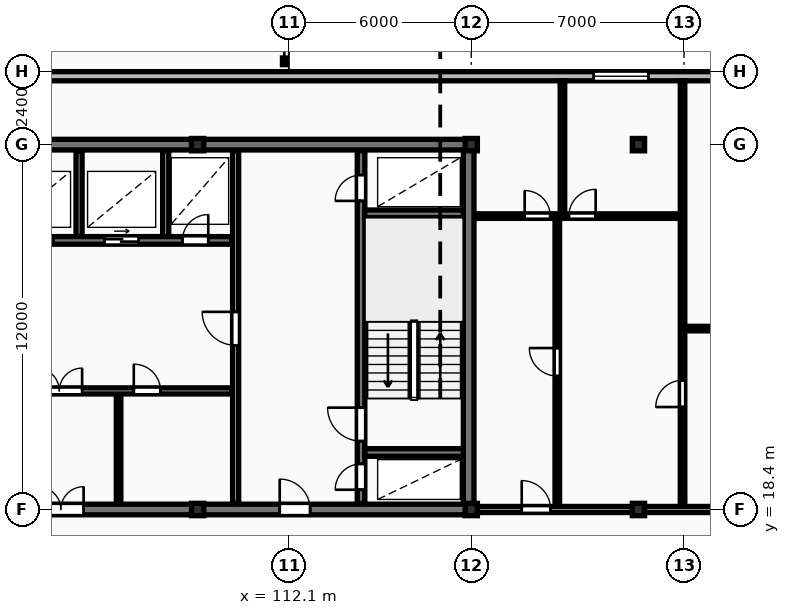
"""IFC4 building model, lengths in metres.
Left out: names, types, materials, properties, quantities, classifications, styles, units other than length and angle.
Written with IfcOpenShell. Run it as: python <this file> out.ifc"""

import sys

from ifc_helpers import new_model, si_unit, direction, frame, frame_2d, origin, origin_2d, place, context, subcontext, project, spatial, rectangle, i_section, extrude, element, fill, save


model = new_model("IFC4")
c1 = context("Model", 3, precision=1e-05, world=origin(), true_north=direction((0.0, 1.0)))
c2 = subcontext(c1, "Body", "Model", "MODEL_VIEW")
j1 = project(units=[si_unit("LENGTHUNIT", "METRE"), si_unit("PLANEANGLEUNIT", "RADIAN")], contexts=[c1])
p1 = place(None, origin())
s1 = spatial("IfcSite", under=j1, at=p1, CompositionType="ELEMENT")
p2 = place(p1, origin())
s2 = spatial("IfcBuilding", under=s1, at=p2, CompositionType="ELEMENT")
p3 = place(p2, frame((0.0, 0.0, 150.1)))
s3 = spatial("IfcBuildingStorey", under=s2, at=p3, CompositionType="ELEMENT", Elevation=150.1)
for number, where, z_axis, x_axis in (
    (1, (109.1, 18.4, 0.0), (0.0, 0.0, 1.0), (1.0, 0.0, 0.0)),
    (2, (109.1, 30.4, 0.0), (0.0, 0.0, 1.0), (1.0, 0.0, 0.0)),
    (3, (118.1, 18.4, 0.0), (0.0, 0.0, 1.0), (1.0, 0.0, 0.0)),
    (4, (118.1, 30.4, 0.0), (0.0, 0.0, 1.0), (1.0, 0.0, 0.0)),
    (5, (123.6, 18.4, 0.0), (0.0, 0.0, 1.0), (1.0, 0.0, 0.0)),
    (6, (123.6, 30.4, 0.0), (0.0, 0.0, 1.0), (1.0, 0.0, 0.0)),
):
    element("IfcColumn", number, at=place(p3, frame(where, z_axis=z_axis, x_axis=x_axis)), inside=s3, PredefinedType="COLUMN", context=c2, shape_type="SweptSolid", body=[
        extrude(i_section(OverallWidth=0.403, OverallDepth=0.406, WebThickness=0.027, FlangeThickness=0.043, FilletRadius=0.015, at=origin_2d()), origin(), (0.0, 0.0, 1.0), 3.6),
    ])
p4 = place(p3, frame((130.7, 32.65, 0.0), z_axis=(0.0, 0.0, 1.0), x_axis=(-1.0, 0.0, 0.0)))
e7 = element("IfcWall", 7, at=p4, inside=s3, PredefinedType="STANDARD", context=c2, shape_type="SweptSolid", body=[
    extrude(rectangle(XDim=58.0, YDim=0.3, at=frame_2d((29.0, 0.0))), origin(), (0.0, 0.0, 1.0), 3.31),
])
p5 = place(p4, frame((50.125, 0.0, 0.85)))
e8 = element("IfcOpeningElement", 8, at=p5, cuts=e7, PredefinedType="OPENING", context=c2, shape_type="SweptSolid", body=[
    extrude(rectangle(XDim=1.8, YDim=1.8, at=frame_2d((0.9, 0.9))), frame((0.0, 0.16, 0.0), z_axis=(0.0, -1.0, 0.0), x_axis=(1.0, 0.0, 0.0)), (0.0, 0.0, 1.0), 0.32),
])
p6 = place(p4, frame((6.775, 0.0, 0.85)))
e9 = element("IfcOpeningElement", 9, at=p6, cuts=e7, PredefinedType="OPENING", context=c2, shape_type="SweptSolid", body=[
    extrude(rectangle(XDim=1.8, YDim=1.8, at=frame_2d((0.9, 0.9))), frame((0.0, 0.16, 0.0), z_axis=(0.0, -1.0, 0.0), x_axis=(1.0, 0.0, 0.0)), (0.0, 0.0, 1.0), 0.32),
])
p7 = place(p4, frame((38.0, 0.0, 0.0)))
e10 = element("IfcOpeningElement", 10, at=p7, cuts=e7, PredefinedType="OPENING", context=c2, shape_type="SweptSolid", body=[
    extrude(rectangle(XDim=1.1, YDim=2.1, at=frame_2d((0.55, 1.05))), frame((0.0, 0.16, 0.0), z_axis=(0.0, -1.0, 0.0), x_axis=(1.0, 0.0, 0.0)), (0.0, 0.0, 1.0), 0.32),
])
p8 = place(p3, frame((81.925, 30.4, 0.0), z_axis=(0.0, 0.0, 1.0), x_axis=(1.0, 0.0, 0.0)))
e11 = element("IfcWall", 11, at=p8, inside=s3, PredefinedType="SHEAR", context=c2, shape_type="SweptSolid", body=[
    extrude(rectangle(XDim=36.265, YDim=0.35, at=frame_2d((18.132, 0.0))), origin(), (0.0, 0.0, 1.0), 3.6),
])
p9 = place(p8, frame((9.675, 0.0, 0.0)))
e12 = element("IfcOpeningElement", 12, at=p9, cuts=e11, PredefinedType="OPENING", context=c2, shape_type="SweptSolid", body=[
    extrude(rectangle(XDim=1.1, YDim=2.1, at=frame_2d((0.55, 1.05))), frame((0.0, 0.185, 0.0), z_axis=(0.0, -1.0, 0.0), x_axis=(1.0, 0.0, 0.0)), (0.0, 0.0, 1.0), 0.37),
])
p10 = place(p3, frame((118.015, 18.575, 0.0), z_axis=(0.0, 0.0, 1.0), x_axis=(0.0, 1.0, 0.0)))
e13 = element("IfcWall", 13, at=p10, inside=s3, PredefinedType="SHEAR", context=c2, shape_type="SweptSolid", body=[
    extrude(rectangle(XDim=11.65, YDim=0.35, at=frame_2d((5.825, 0.0))), origin(), (0.0, 0.0, 1.0), 3.6),
])
p11 = place(p3, frame((81.925, 18.4, 0.0), z_axis=(0.0, 0.0, 1.0), x_axis=(1.0, 0.0, 0.0)))
e14 = element("IfcWall", 14, at=p11, inside=s3, PredefinedType="SHEAR", context=c2, shape_type="SweptSolid", body=[
    extrude(rectangle(XDim=36.265, YDim=0.35, at=frame_2d((18.132, 0.0))), origin(), (0.0, 0.0, 1.0), 3.6),
])
p12 = place(p11, frame((5.675, 0.0, 0.0)))
e15 = element("IfcOpeningElement", 15, at=p12, cuts=e14, PredefinedType="OPENING", context=c2, shape_type="SweptSolid", body=[
    extrude(rectangle(XDim=1.0, YDim=2.15, at=frame_2d((0.5, 1.075))), frame((0.0, 0.185, 0.0), z_axis=(0.0, -1.0, 0.0), x_axis=(1.0, 0.0, 0.0)), (0.0, 0.0, 1.0), 0.37),
])
p13 = place(p11, frame((21.925, 0.0, 0.0)))
e16 = element("IfcOpeningElement", 16, at=p13, cuts=e14, PredefinedType="OPENING", context=c2, shape_type="SweptSolid", body=[
    extrude(rectangle(XDim=1.5, YDim=2.2, at=frame_2d((0.75, 1.1))), frame((0.0, 0.185, 0.0), z_axis=(0.0, -1.0, 0.0), x_axis=(1.0, 0.0, 0.0)), (0.0, 0.0, 1.0), 0.37),
])
p14 = place(p11, frame((29.875, 0.0, 0.0)))
e17 = element("IfcOpeningElement", 17, at=p14, cuts=e14, PredefinedType="OPENING", context=c2, shape_type="SweptSolid", body=[
    extrude(rectangle(XDim=1.0, YDim=2.15, at=frame_2d((0.5, 1.075))), frame((0.0, 0.185, 0.0), z_axis=(0.0, -1.0, 0.0), x_axis=(1.0, 0.0, 0.0)), (0.0, 0.0, 1.0), 0.37),
])
for number, where, z_axis, x_axis in (
    (18, (105.2, 27.38, 0.0), (0.0, 0.0, 1.0), (0.0, 1.0, 0.0)),
    (19, (108.05, 27.38, 0.0), (0.0, 0.0, 1.0), (0.0, 1.0, 0.0)),
):
    element("IfcWall", number, at=place(p3, frame(where, z_axis=z_axis, x_axis=x_axis)), inside=s3, PredefinedType="PARTITIONING", context=c2, shape_type="SweptSolid", body=[
        extrude(rectangle(XDim=2.82, YDim=0.2, at=frame_2d((1.41, 0.0))), origin(), (0.0, 0.0, 1.0), 3.31),
    ])
p15 = place(p3, frame((99.68, 27.25, 0.0), z_axis=(0.0, 0.0, 1.0), x_axis=(1.0, 0.0, 0.0)))
e20 = element("IfcWall", 20, at=p15, inside=s3, PredefinedType="SHEAR", context=c2, shape_type="SweptSolid", body=[
    extrude(rectangle(XDim=10.54, YDim=0.25, at=frame_2d((5.27, 0.0))), origin(), (0.0, 0.0, 1.0), 3.6),
])
p16 = place(p15, frame((0.76, 0.0, 0.0)))
e21 = element("IfcOpeningElement", 21, at=p16, cuts=e20, PredefinedType="OPENING", context=c2, shape_type="SweptSolid", body=[
    extrude(rectangle(XDim=1.12, YDim=2.12, at=frame_2d((0.56, 1.06))), frame((0.0, 0.135, 0.0), z_axis=(0.0, -1.0, 0.0), x_axis=(1.0, 0.0, 0.0)), (0.0, 0.0, 1.0), 0.27),
])
p17 = place(p15, frame((3.56, 0.0, 0.0)))
e22 = element("IfcOpeningElement", 22, at=p17, cuts=e20, PredefinedType="OPENING", context=c2, shape_type="SweptSolid", body=[
    extrude(rectangle(XDim=1.12, YDim=2.12, at=frame_2d((0.56, 1.06))), frame((0.0, 0.135, 0.0), z_axis=(0.0, -1.0, 0.0), x_axis=(1.0, 0.0, 0.0)), (0.0, 0.0, 1.0), 0.27),
])
p18 = place(p15, frame((6.36, 0.0, 0.0)))
e23 = element("IfcOpeningElement", 23, at=p18, cuts=e20, PredefinedType="OPENING", context=c2, shape_type="SweptSolid", body=[
    extrude(rectangle(XDim=1.12, YDim=2.12, at=frame_2d((0.56, 1.06))), frame((0.0, 0.135, 0.0), z_axis=(0.0, -1.0, 0.0), x_axis=(1.0, 0.0, 0.0)), (0.0, 0.0, 1.0), 0.27),
])
p19 = place(p15, frame((8.92, 0.0, 0.0)))
e24 = element("IfcOpeningElement", 24, at=p19, cuts=e20, PredefinedType="OPENING", context=c2, shape_type="SweptSolid", body=[
    extrude(rectangle(XDim=0.85, YDim=2.05, at=frame_2d((0.425, 1.025))), frame((0.0, 0.135, 0.0), z_axis=(0.0, -1.0, 0.0), x_axis=(1.0, 0.0, 0.0)), (0.0, 0.0, 1.0), 0.27),
])
p20 = place(p3, frame((106.5, 18.6, 0.0), z_axis=(0.0, 0.0, 1.0), x_axis=(0.0, 1.0, 0.0)))
e25 = element("IfcWall", 25, at=p20, inside=s3, PredefinedType="PARTITIONING", context=c2, shape_type="SweptSolid", body=[
    extrude(rectangle(XDim=3.6, YDim=0.15, at=frame_2d((1.8, 0.0))), origin(), (0.0, 0.0, 1.0), 3.31),
])
p21 = place(p3, frame((91.08, 22.3, 0.0), z_axis=(0.0, 0.0, 1.0), x_axis=(1.0, 0.0, 0.0)))
e26 = element("IfcWall", 26, at=p21, inside=s3, PredefinedType="PARTITIONING", context=c2, shape_type="SweptSolid", body=[
    extrude(rectangle(XDim=19.14, YDim=0.2, at=frame_2d((9.57, 0.0))), origin(), (0.0, 0.0, 1.0), 3.31),
])
p22 = place(p21, frame((1.15, 0.0, 0.0)))
e27 = element("IfcOpeningElement", 27, at=p22, cuts=e26, PredefinedType="OPENING", context=c2, shape_type="SweptSolid", body=[
    extrude(rectangle(XDim=0.85, YDim=2.05, at=frame_2d((0.425, 1.025))), frame((0.0, 0.11, 0.0), z_axis=(0.0, -1.0, 0.0), x_axis=(1.0, 0.0, 0.0)), (0.0, 0.0, 1.0), 0.22),
])
p23 = place(p21, frame((3.2, 0.0, 0.0)))
e28 = element("IfcOpeningElement", 28, at=p23, cuts=e26, PredefinedType="OPENING", context=c2, shape_type="SweptSolid", body=[
    extrude(rectangle(XDim=0.85, YDim=2.05, at=frame_2d((0.425, 1.025))), frame((0.0, 0.11, 0.0), z_axis=(0.0, -1.0, 0.0), x_axis=(1.0, 0.0, 0.0)), (0.0, 0.0, 1.0), 0.22),
])
p24 = place(p21, frame((12.72, 0.0, 0.0)))
e29 = element("IfcOpeningElement", 29, at=p24, cuts=e26, PredefinedType="OPENING", context=c2, shape_type="SweptSolid", body=[
    extrude(rectangle(XDim=1.5, YDim=2.2, at=frame_2d((0.75, 1.1))), frame((0.0, 0.11, 0.0), z_axis=(0.0, -1.0, 0.0), x_axis=(1.0, 0.0, 0.0)), (0.0, 0.0, 1.0), 0.22),
])
p25 = place(p21, frame((6.42, 0.0, 0.0)))
e30 = element("IfcOpeningElement", 30, at=p25, cuts=e26, PredefinedType="OPENING", context=c2, shape_type="SweptSolid", body=[
    extrude(rectangle(XDim=0.92, YDim=2.08, at=frame_2d((0.46, 1.04))), frame((0.0, 0.11, 0.0), z_axis=(0.0, -1.0, 0.0), x_axis=(1.0, 0.0, 0.0)), (0.0, 0.0, 1.0), 0.22),
])
p26 = place(p21, frame((15.92, 0.0, 0.0)))
e31 = element("IfcOpeningElement", 31, at=p26, cuts=e26, PredefinedType="OPENING", context=c2, shape_type="SweptSolid", body=[
    extrude(rectangle(XDim=0.88, YDim=2.06, at=frame_2d((0.44, 1.03))), frame((0.0, 0.11, 0.0), z_axis=(0.0, -1.0, 0.0), x_axis=(1.0, 0.0, 0.0)), (0.0, 0.0, 1.0), 0.22),
])
p27 = place(p3, frame((110.35, 18.6, 0.0), z_axis=(0.0, 0.0, 1.0), x_axis=(0.0, 1.0, 0.0)))
e32 = element("IfcWall", 32, at=p27, inside=s3, PredefinedType="PARTITIONING", context=c2, shape_type="SweptSolid", body=[
    extrude(rectangle(XDim=11.6, YDim=0.2, at=frame_2d((5.8, 0.0))), origin(), (0.0, 0.0, 1.0), 3.31),
])
p28 = place(p27, frame((5.2, 0.0, 0.0)))
e33 = element("IfcOpeningElement", 33, at=p28, cuts=e32, PredefinedType="OPENING", context=c2, shape_type="SweptSolid", body=[
    extrude(rectangle(XDim=1.1, YDim=2.15, at=frame_2d((0.55, 1.075))), frame((0.0, 0.11, 0.0), z_axis=(0.0, -1.0, 0.0), x_axis=(1.0, 0.0, 0.0)), (0.0, 0.0, 1.0), 0.22),
])
p29 = place(p3, frame((114.475, 18.6, 0.0), z_axis=(0.0, 0.0, 1.0), x_axis=(0.0, 1.0, 0.0)))
e34 = element("IfcWall", 34, at=p29, inside=s3, PredefinedType="SHEAR", context=c2, shape_type="SweptSolid", body=[
    extrude(rectangle(XDim=11.6, YDim=0.25, at=frame_2d((5.8, 0.0))), origin(), (0.0, 0.0, 1.0), 3.6),
])
p30 = place(p29, frame((0.45, 0.0, 0.0)))
e35 = element("IfcOpeningElement", 35, at=p30, cuts=e34, PredefinedType="OPENING", context=c2, shape_type="SweptSolid", body=[
    extrude(rectangle(XDim=0.85, YDim=2.05, at=frame_2d((0.425, 1.025))), frame((0.0, 0.135, 0.0), z_axis=(0.0, -1.0, 0.0), x_axis=(1.0, 0.0, 0.0)), (0.0, 0.0, 1.0), 0.27),
])
p31 = place(p29, frame((2.05, 0.0, 0.0)))
e36 = element("IfcOpeningElement", 36, at=p31, cuts=e34, PredefinedType="OPENING", context=c2, shape_type="SweptSolid", body=[
    extrude(rectangle(XDim=1.1, YDim=2.1, at=frame_2d((0.55, 1.05))), frame((0.0, 0.135, 0.0), z_axis=(0.0, -1.0, 0.0), x_axis=(1.0, 0.0, 0.0)), (0.0, 0.0, 1.0), 0.27),
])
p32 = place(p29, frame((9.95, 0.0, 0.0)))
e37 = element("IfcOpeningElement", 37, at=p32, cuts=e34, PredefinedType="OPENING", context=c2, shape_type="SweptSolid", body=[
    extrude(rectangle(XDim=0.85, YDim=2.05, at=frame_2d((0.425, 1.025))), frame((0.0, 0.135, 0.0), z_axis=(0.0, -1.0, 0.0), x_axis=(1.0, 0.0, 0.0)), (0.0, 0.0, 1.0), 0.27),
])
for number, where, z_axis, x_axis in (
    (38, (114.6, 20.275, 0.0), (0.0, 0.0, 1.0), (1.0, 0.0, 0.0)),
    (39, (114.6, 28.125, 0.0), (0.0, 0.0, 1.0), (1.0, 0.0, 0.0)),
):
    element("IfcWall", number, at=place(p3, frame(where, z_axis=z_axis, x_axis=x_axis)), inside=s3, PredefinedType="SHEAR", context=c2, shape_type="SweptSolid", body=[
        extrude(rectangle(XDim=3.24, YDim=0.25, at=frame_2d((1.62, 0.0))), origin(), (0.0, 0.0, 1.0), 3.6),
    ])
p33 = place(p3, frame((125.05, 24.35, 0.0), z_axis=(0.0, 0.0, 1.0), x_axis=(1.0, 0.0, 0.0)))
e40 = element("IfcWall", 40, at=p33, inside=s3, PredefinedType="PARTITIONING", context=c2, shape_type="SweptSolid", body=[
    extrude(rectangle(XDim=5.65, YDim=0.15, at=frame_2d((2.825, 0.0))), origin(), (0.0, 0.0, 1.0), 3.31),
])
p34 = place(p33, frame((2.405, 0.0, 0.0)))
e41 = element("IfcOpeningElement", 41, at=p34, cuts=e40, PredefinedType="OPENING", context=c2, shape_type="SweptSolid", body=[
    extrude(rectangle(XDim=0.84, YDim=2.04, at=frame_2d((0.42, 1.02))), frame((0.0, 0.085, 0.0), z_axis=(0.0, -1.0, 0.0), x_axis=(1.0, 0.0, 0.0)), (0.0, 0.0, 1.0), 0.17),
])
p35 = place(p3, frame((125.05, 18.45, 0.0), z_axis=(0.0, 0.0, 1.0), x_axis=(0.0, 1.0, 0.0)))
e42 = element("IfcWall", 42, at=p35, inside=s3, PredefinedType="PARTITIONING", context=c2, shape_type="SweptSolid", body=[
    extrude(rectangle(XDim=14.05, YDim=0.15, at=frame_2d((7.025, 0.0))), origin(), (0.0, 0.0, 1.0), 3.31),
])
p36 = place(p35, frame((3.32, 0.0, 0.0)))
e43 = element("IfcOpeningElement", 43, at=p36, cuts=e42, PredefinedType="OPENING", context=c2, shape_type="SweptSolid", body=[
    extrude(rectangle(XDim=0.88, YDim=2.06, at=frame_2d((0.44, 1.03))), frame((0.0, 0.085, 0.0), z_axis=(0.0, -1.0, 0.0), x_axis=(1.0, 0.0, 0.0)), (0.0, 0.0, 1.0), 0.17),
])
p37 = place(p3, frame((120.93, 18.45, 0.0), z_axis=(0.0, 0.0, 1.0), x_axis=(0.0, 1.0, 0.0)))
e44 = element("IfcWall", 44, at=p37, inside=s3, PredefinedType="PARTITIONING", context=c2, shape_type="SweptSolid", body=[
    extrude(rectangle(XDim=9.6, YDim=0.15, at=frame_2d((4.8, 0.0))), origin(), (0.0, 0.0, 1.0), 3.31),
])
p38 = place(p37, frame((4.34, 0.0, 0.0)))
e45 = element("IfcOpeningElement", 45, at=p38, cuts=e44, PredefinedType="OPENING", context=c2, shape_type="SweptSolid", body=[
    extrude(rectangle(XDim=0.92, YDim=2.08, at=frame_2d((0.46, 1.04))), frame((0.0, 0.085, 0.0), z_axis=(0.0, -1.0, 0.0), x_axis=(1.0, 0.0, 0.0)), (0.0, 0.0, 1.0), 0.17),
])
p39 = place(p3, frame((121.1, 28.05, 0.0), z_axis=(0.0, 0.0, 1.0), x_axis=(0.0, 1.0, 0.0)))
e46 = element("IfcWall", 46, at=p39, inside=s3, PredefinedType="PARTITIONING", context=c2, shape_type="SweptSolid", body=[
    extrude(rectangle(XDim=4.45, YDim=0.15, at=frame_2d((2.225, 0.0))), origin(), (0.0, 0.0, 1.0), 3.31),
])
p40 = place(p3, frame((118.27, 28.05, 0.0), z_axis=(0.0, 0.0, 1.0), x_axis=(1.0, 0.0, 0.0)))
e47 = element("IfcWall", 47, at=p40, inside=s3, PredefinedType="PARTITIONING", context=c2, shape_type="SweptSolid", body=[
    extrude(rectangle(XDim=6.76, YDim=0.15, at=frame_2d((3.38, 0.0))), origin(), (0.0, 0.0, 1.0), 3.31),
])
p41 = place(p40, frame((1.587, 0.0, 0.0)))
e48 = element("IfcOpeningElement", 48, at=p41, cuts=e47, PredefinedType="OPENING", context=c2, shape_type="SweptSolid", body=[
    extrude(rectangle(XDim=0.84, YDim=2.04, at=frame_2d((0.42, 1.02))), frame((0.0, 0.085, 0.0), z_axis=(0.0, -1.0, 0.0), x_axis=(1.0, 0.0, 0.0)), (0.0, 0.0, 1.0), 0.17),
])
p42 = place(p40, frame((3.042, 0.0, 0.0)))
e49 = element("IfcOpeningElement", 49, at=p42, cuts=e47, PredefinedType="OPENING", context=c2, shape_type="SweptSolid", body=[
    extrude(rectangle(XDim=0.88, YDim=2.06, at=frame_2d((0.44, 1.03))), frame((0.0, 0.085, 0.0), z_axis=(0.0, -1.0, 0.0), x_axis=(1.0, 0.0, 0.0)), (0.0, 0.0, 1.0), 0.17),
])
p43 = place(p3, frame((118.25, 18.4, 0.0), z_axis=(0.0, 0.0, 1.0), x_axis=(1.0, 0.0, 0.0)))
e50 = element("IfcWall", 50, at=p43, inside=s3, PredefinedType="PARTITIONING", context=c2, shape_type="SweptSolid", body=[
    extrude(rectangle(XDim=12.45, YDim=0.2, at=frame_2d((6.225, 0.0))), origin(), (0.0, 0.0, 1.0), 2.698),
])
p44 = place(p43, frame((1.51, 0.0, 0.0)))
e51 = element("IfcOpeningElement", 51, at=p44, cuts=e50, PredefinedType="OPENING", context=c2, shape_type="SweptSolid", body=[
    extrude(rectangle(XDim=0.95, YDim=2.15, at=frame_2d((0.475, 1.075))), frame((0.0, 0.11, 0.0), z_axis=(0.0, -1.0, 0.0), x_axis=(1.0, 0.0, 0.0)), (0.0, 0.0, 1.0), 0.22),
])
p45 = place(p6, origin())
e52 = element("IfcWindow", 52, at=p45, inside=s3, PartitioningType="SINGLE_PANEL", PredefinedType="WINDOW", context=c2, shape_type="SweptSolid", body=[
    extrude(rectangle(XDim=1.8, YDim=1.8, at=frame_2d((0.9, 0.9))), frame((0.0, 0.03, 0.0), z_axis=(0.0, -1.0, 0.0), x_axis=(1.0, 0.0, 0.0)), (0.0, 0.0, 1.0), 0.06),
])
fill(e9, e52)
p46 = place(p13, origin())
e53 = element("IfcDoor", 53, at=p46, inside=s3, OperationType="DOUBLE_DOOR_SINGLE_SWING", PredefinedType="DOOR", context=c2, shape_type="SweptSolid", body=[
    extrude(rectangle(XDim=1.5, YDim=2.2, at=frame_2d((0.75, 1.1))), frame((0.0, 0.025, 0.0), z_axis=(0.0, -1.0, 0.0), x_axis=(1.0, 0.0, 0.0)), (0.0, 0.0, 1.0), 0.05),
])
fill(e16, e53)
p47 = place(p14, origin())
e54 = element("IfcDoor", 54, at=p47, inside=s3, OperationType="SINGLE_SWING_LEFT", PredefinedType="DOOR", context=c2, shape_type="SweptSolid", body=[
    extrude(rectangle(XDim=1.0, YDim=2.15, at=frame_2d((0.5, 1.075))), frame((0.0, 0.025, 0.0), z_axis=(0.0, -1.0, 0.0), x_axis=(1.0, 0.0, 0.0)), (0.0, 0.0, 1.0), 0.05),
])
fill(e17, e54)
p48 = place(p17, origin())
e55 = element("IfcDoor", 55, at=p48, inside=s3, OperationType="SLIDING_TO_RIGHT", PredefinedType="DOOR", context=c2, shape_type="SweptSolid", body=[
    extrude(rectangle(XDim=1.12, YDim=2.12, at=frame_2d((0.56, 1.06))), frame((0.0, 0.025, 0.0), z_axis=(0.0, -1.0, 0.0), x_axis=(1.0, 0.0, 0.0)), (0.0, 0.0, 1.0), 0.05),
])
fill(e22, e55)
p49 = place(p18, origin())
e56 = element("IfcDoor", 56, at=p49, inside=s3, OperationType="SLIDING_TO_RIGHT", PredefinedType="DOOR", context=c2, shape_type="SweptSolid", body=[
    extrude(rectangle(XDim=1.12, YDim=2.12, at=frame_2d((0.56, 1.06))), frame((0.0, 0.025, 0.0), z_axis=(0.0, -1.0, 0.0), x_axis=(1.0, 0.0, 0.0)), (0.0, 0.0, 1.0), 0.05),
])
fill(e23, e56)
p50 = place(p19, origin())
e57 = element("IfcDoor", 57, at=p50, inside=s3, OperationType="SINGLE_SWING_RIGHT", PredefinedType="DOOR", context=c2, shape_type="SweptSolid", body=[
    extrude(rectangle(XDim=0.85, YDim=2.05, at=frame_2d((0.425, 1.025))), frame((0.0, 0.025, 0.0), z_axis=(0.0, -1.0, 0.0), x_axis=(1.0, 0.0, 0.0)), (0.0, 0.0, 1.0), 0.05),
])
fill(e24, e57)
p51 = place(p24, origin())
e58 = element("IfcDoor", 58, at=p51, inside=s3, OperationType="DOUBLE_DOOR_SINGLE_SWING", PredefinedType="DOOR", context=c2, shape_type="SweptSolid", body=[
    extrude(rectangle(XDim=1.5, YDim=2.2, at=frame_2d((0.75, 1.1))), frame((0.0, 0.025, 0.0), z_axis=(0.0, -1.0, 0.0), x_axis=(1.0, 0.0, 0.0)), (0.0, 0.0, 1.0), 0.05),
])
fill(e29, e58)
p52 = place(p26, origin())
e59 = element("IfcDoor", 59, at=p52, inside=s3, OperationType="SINGLE_SWING_LEFT", PredefinedType="DOOR", context=c2, shape_type="SweptSolid", body=[
    extrude(rectangle(XDim=0.88, YDim=2.06, at=frame_2d((0.44, 1.03))), frame((0.0, 0.025, 0.0), z_axis=(0.0, -1.0, 0.0), x_axis=(1.0, 0.0, 0.0)), (0.0, 0.0, 1.0), 0.05),
])
fill(e31, e59)
p53 = place(p28, origin())
e60 = element("IfcDoor", 60, at=p53, inside=s3, OperationType="SINGLE_SWING_RIGHT", PredefinedType="DOOR", context=c2, shape_type="SweptSolid", body=[
    extrude(rectangle(XDim=1.1, YDim=2.15, at=frame_2d((0.55, 1.075))), frame((0.0, 0.025, 0.0), z_axis=(0.0, -1.0, 0.0), x_axis=(1.0, 0.0, 0.0)), (0.0, 0.0, 1.0), 0.05),
])
fill(e33, e60)
p54 = place(p30, origin())
e61 = element("IfcDoor", 61, at=p54, inside=s3, OperationType="SINGLE_SWING_LEFT", PredefinedType="DOOR", context=c2, shape_type="SweptSolid", body=[
    extrude(rectangle(XDim=0.85, YDim=2.05, at=frame_2d((0.425, 1.025))), frame((0.0, 0.025, 0.0), z_axis=(0.0, -1.0, 0.0), x_axis=(1.0, 0.0, 0.0)), (0.0, 0.0, 1.0), 0.05),
])
fill(e35, e61)
p55 = place(p31, origin())
e62 = element("IfcDoor", 62, at=p55, inside=s3, OperationType="SINGLE_SWING_RIGHT", PredefinedType="DOOR", context=c2, shape_type="SweptSolid", body=[
    extrude(rectangle(XDim=1.1, YDim=2.1, at=frame_2d((0.55, 1.05))), frame((0.0, 0.025, 0.0), z_axis=(0.0, -1.0, 0.0), x_axis=(1.0, 0.0, 0.0)), (0.0, 0.0, 1.0), 0.05),
])
fill(e36, e62)
p56 = place(p32, origin())
e63 = element("IfcDoor", 63, at=p56, inside=s3, OperationType="SINGLE_SWING_LEFT", PredefinedType="DOOR", context=c2, shape_type="SweptSolid", body=[
    extrude(rectangle(XDim=0.85, YDim=2.05, at=frame_2d((0.425, 1.025))), frame((0.0, 0.025, 0.0), z_axis=(0.0, -1.0, 0.0), x_axis=(1.0, 0.0, 0.0)), (0.0, 0.0, 1.0), 0.05),
])
fill(e37, e63)
p57 = place(p36, origin())
e64 = element("IfcDoor", 64, at=p57, inside=s3, OperationType="SINGLE_SWING_LEFT", PredefinedType="DOOR", context=c2, shape_type="SweptSolid", body=[
    extrude(rectangle(XDim=0.88, YDim=2.06, at=frame_2d((0.44, 1.03))), frame((0.0, 0.025, 0.0), z_axis=(0.0, -1.0, 0.0), x_axis=(1.0, 0.0, 0.0)), (0.0, 0.0, 1.0), 0.05),
])
fill(e43, e64)
p58 = place(p38, origin())
e65 = element("IfcDoor", 65, at=p58, inside=s3, OperationType="SINGLE_SWING_RIGHT", PredefinedType="DOOR", context=c2, shape_type="SweptSolid", body=[
    extrude(rectangle(XDim=0.92, YDim=2.08, at=frame_2d((0.46, 1.04))), frame((0.0, 0.025, 0.0), z_axis=(0.0, -1.0, 0.0), x_axis=(1.0, 0.0, 0.0)), (0.0, 0.0, 1.0), 0.05),
])
fill(e45, e65)
p59 = place(p41, origin())
e66 = element("IfcDoor", 66, at=p59, inside=s3, OperationType="SINGLE_SWING_LEFT", PredefinedType="DOOR", context=c2, shape_type="SweptSolid", body=[
    extrude(rectangle(XDim=0.84, YDim=2.04, at=frame_2d((0.42, 1.02))), frame((0.0, 0.025, 0.0), z_axis=(0.0, -1.0, 0.0), x_axis=(1.0, 0.0, 0.0)), (0.0, 0.0, 1.0), 0.05),
])
fill(e48, e66)
p60 = place(p42, origin())
e67 = element("IfcDoor", 67, at=p60, inside=s3, OperationType="SINGLE_SWING_RIGHT", PredefinedType="DOOR", context=c2, shape_type="SweptSolid", body=[
    extrude(rectangle(XDim=0.88, YDim=2.06, at=frame_2d((0.44, 1.03))), frame((0.0, 0.025, 0.0), z_axis=(0.0, -1.0, 0.0), x_axis=(1.0, 0.0, 0.0)), (0.0, 0.0, 1.0), 0.05),
])
fill(e49, e67)
p61 = place(p44, origin())
e68 = element("IfcDoor", 68, at=p61, inside=s3, OperationType="SINGLE_SWING_LEFT", PredefinedType="DOOR", context=c2, shape_type="SweptSolid", body=[
    extrude(rectangle(XDim=0.95, YDim=2.15, at=frame_2d((0.475, 1.075))), frame((0.0, 0.025, 0.0), z_axis=(0.0, -1.0, 0.0), x_axis=(1.0, 0.0, 0.0)), (0.0, 0.0, 1.0), 0.05),
])
fill(e51, e68)
save(model, sys.argv[1])
